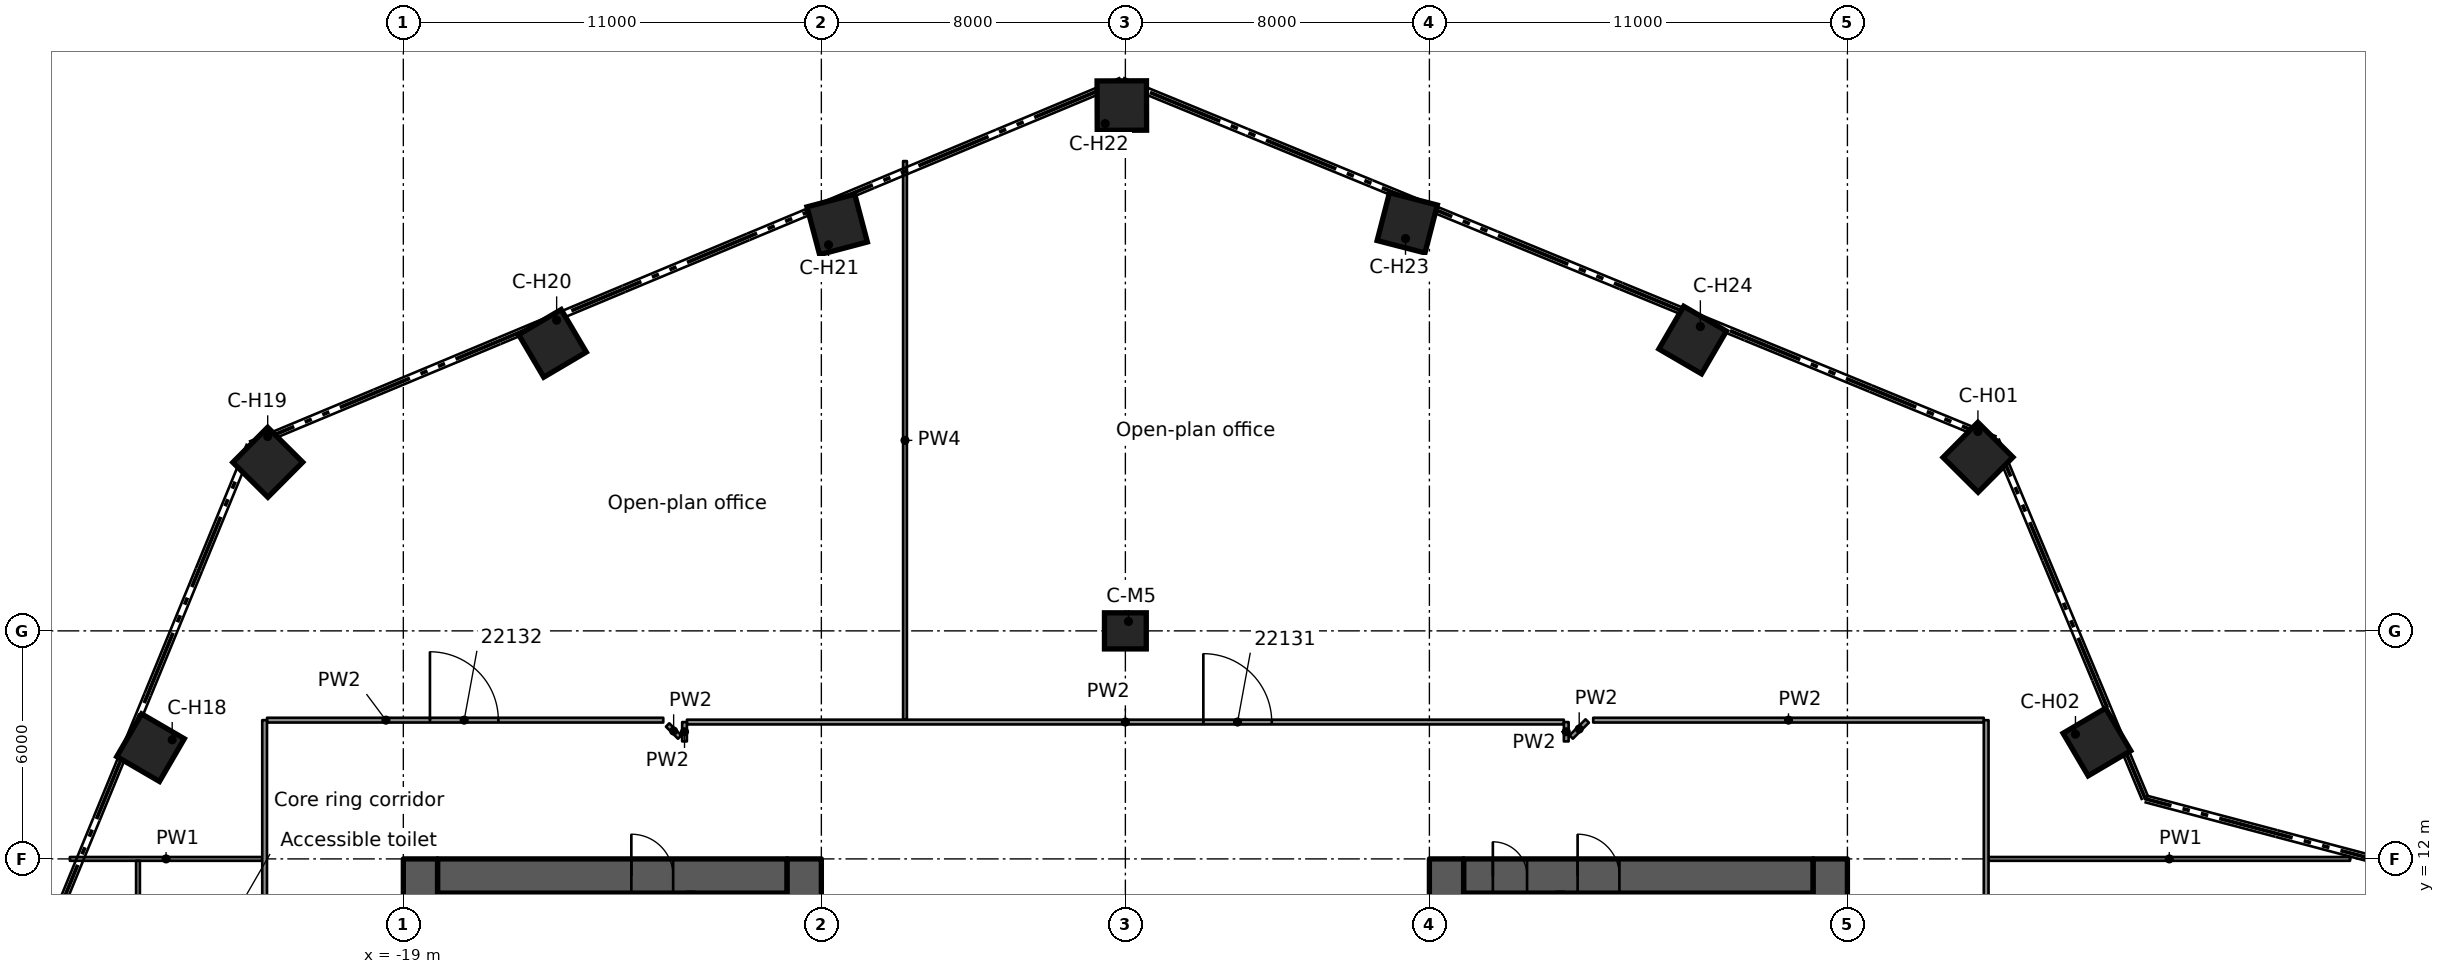
"""IFC4 building model, lengths in metres.
Left out: names, types, materials, properties, quantities, classifications, styles, units other than length and angle.
Written with IfcOpenShell. Run it as: python <this file> out.ifc"""

import sys

from ifc_helpers import new_model, si_unit, direction, frame, frame_2d, origin, origin_2d, place, context, subcontext, project, spatial, rectangle, extrude, element, fill, save


model = new_model("IFC4")
c1 = context("Model", 3, precision=1e-05, world=origin(), true_north=direction((0.0, 1.0)))
c2 = subcontext(c1, "Body", "Model", "MODEL_VIEW")
j1 = project(units=[si_unit("LENGTHUNIT", "METRE"), si_unit("PLANEANGLEUNIT", "RADIAN")], contexts=[c1])
p1 = place(None, origin())
s1 = spatial("IfcSite", under=j1, at=p1, CompositionType="ELEMENT")
p2 = place(p1, origin())
s2 = spatial("IfcBuilding", under=s1, at=p2, CompositionType="ELEMENT")
p3 = place(p2, frame((0.0, 0.0, 116.2)))
s3 = spatial("IfcBuildingStorey", under=s2, at=p3, CompositionType="ELEMENT", Elevation=116.2)
p4 = place(p3, frame((-18.1, 11.55, 0.0), z_axis=(0.0, 0.0, 1.0), x_axis=(1.0, 0.0, 0.0)))
e1 = element("IfcWall", 1, at=p4, inside=s3, PredefinedType="SHEAR", context=c2, shape_type="SweptSolid", body=[
    extrude(rectangle(XDim=9.2, YDim=0.9, at=frame_2d((4.6, 0.0))), origin(), (0.0, 0.0, 1.0), 3.5),
])
p5 = place(p4, frame((5.1, 0.0, 0.0)))
e2 = element("IfcOpeningElement", 2, at=p5, cuts=e1, PredefinedType="OPENING", context=c2, shape_type="SweptSolid", body=[
    extrude(rectangle(XDim=1.1, YDim=2.1, at=frame_2d((0.55, 1.05))), frame((0.0, 0.46, 0.0), z_axis=(0.0, -1.0, 0.0), x_axis=(1.0, 0.0, 0.0)), (0.0, 0.0, 1.0), 0.92),
])
p6 = place(p3, frame((-18.55, -12.0, 0.0), z_axis=(0.0, 0.0, 1.0), x_axis=(0.0, 1.0, 0.0)))
e3 = element("IfcWall", 3, at=p6, inside=s3, PredefinedType="SHEAR", context=c2, shape_type="SweptSolid", body=[
    extrude(rectangle(XDim=24.0, YDim=0.9, at=frame_2d((12.0, 0.0))), origin(), (0.0, 0.0, 1.0), 3.5),
])
p7 = place(p6, frame((10.1, 0.0, 0.0)))
e4 = element("IfcOpeningElement", 4, at=p7, cuts=e3, PredefinedType="OPENING", context=c2, shape_type="SweptSolid", body=[
    extrude(rectangle(XDim=1.8, YDim=2.1, at=frame_2d((0.9, 1.05))), frame((0.0, 0.46, 0.0), z_axis=(0.0, -1.0, 0.0), x_axis=(1.0, 0.0, 0.0)), (0.0, 0.0, 1.0), 0.92),
])
p8 = place(p3, frame((-8.45, -12.0, 0.0), z_axis=(0.0, 0.0, 1.0), x_axis=(0.0, 1.0, 0.0)))
e5 = element("IfcWall", 5, at=p8, inside=s3, PredefinedType="SHEAR", context=c2, shape_type="SweptSolid", body=[
    extrude(rectangle(XDim=24.0, YDim=0.9, at=frame_2d((12.0, 0.0))), origin(), (0.0, 0.0, 1.0), 3.5),
])
p9 = place(p8, frame((9.6, 0.0, 0.0)))
e6 = element("IfcOpeningElement", 6, at=p9, cuts=e5, PredefinedType="OPENING", context=c2, shape_type="SweptSolid", body=[
    extrude(rectangle(XDim=1.8, YDim=2.1, at=frame_2d((0.9, 1.05))), frame((0.0, 0.46, 0.0), z_axis=(0.0, -1.0, 0.0), x_axis=(1.0, 0.0, 0.0)), (0.0, 0.0, 1.0), 0.92),
])
p10 = place(p8, frame((19.65, 0.0, 0.0)))
e7 = element("IfcOpeningElement", 7, at=p10, cuts=e5, PredefinedType="OPENING", context=c2, shape_type="SweptSolid", body=[
    extrude(rectangle(XDim=1.1, YDim=2.1, at=frame_2d((0.55, 1.05))), frame((0.0, 0.46, 0.0), z_axis=(0.0, -1.0, 0.0), x_axis=(1.0, 0.0, 0.0)), (0.0, 0.0, 1.0), 0.92),
])
p11 = place(p3, frame((8.9, 11.55, 0.0), z_axis=(0.0, 0.0, 1.0), x_axis=(1.0, 0.0, 0.0)))
e8 = element("IfcWall", 8, at=p11, inside=s3, PredefinedType="SHEAR", context=c2, shape_type="SweptSolid", body=[
    extrude(rectangle(XDim=9.2, YDim=0.9, at=frame_2d((4.6, 0.0))), origin(), (0.0, 0.0, 1.0), 3.5),
])
p12 = place(p11, frame((3.0, 0.0, 0.0)))
e9 = element("IfcOpeningElement", 9, at=p12, cuts=e8, PredefinedType="OPENING", context=c2, shape_type="SweptSolid", body=[
    extrude(rectangle(XDim=1.1, YDim=2.1, at=frame_2d((0.55, 1.05))), frame((0.0, 0.46, 0.0), z_axis=(0.0, -1.0, 0.0), x_axis=(1.0, 0.0, 0.0)), (0.0, 0.0, 1.0), 0.92),
])
p13 = place(p11, frame((0.77, 0.0, 0.0)))
e10 = element("IfcOpeningElement", 10, at=p13, cuts=e8, PredefinedType="OPENING", context=c2, shape_type="SweptSolid", body=[
    extrude(rectangle(XDim=0.9, YDim=2.1, at=frame_2d((0.45, 1.05))), frame((0.0, 0.46, 0.0), z_axis=(0.0, -1.0, 0.0), x_axis=(1.0, 0.0, 0.0)), (0.0, 0.0, 1.0), 0.92),
])
p14 = place(p3, frame((8.45, -12.0, 0.0), z_axis=(0.0, 0.0, 1.0), x_axis=(0.0, 1.0, 0.0)))
e11 = element("IfcWall", 11, at=p14, inside=s3, PredefinedType="SHEAR", context=c2, shape_type="SweptSolid", body=[
    extrude(rectangle(XDim=24.0, YDim=0.9, at=frame_2d((12.0, 0.0))), origin(), (0.0, 0.0, 1.0), 3.5),
])
p15 = place(p14, frame((12.6, 0.0, 0.0)))
e12 = element("IfcOpeningElement", 12, at=p15, cuts=e11, PredefinedType="OPENING", context=c2, shape_type="SweptSolid", body=[
    extrude(rectangle(XDim=1.8, YDim=2.1, at=frame_2d((0.9, 1.05))), frame((0.0, 0.46, 0.0), z_axis=(0.0, -1.0, 0.0), x_axis=(1.0, 0.0, 0.0)), (0.0, 0.0, 1.0), 0.92),
])
p16 = place(p14, frame((3.25, 0.0, 0.0)))
e13 = element("IfcOpeningElement", 13, at=p16, cuts=e11, PredefinedType="OPENING", context=c2, shape_type="SweptSolid", body=[
    extrude(rectangle(XDim=1.1, YDim=2.1, at=frame_2d((0.55, 1.05))), frame((0.0, 0.46, 0.0), z_axis=(0.0, -1.0, 0.0), x_axis=(1.0, 0.0, 0.0)), (0.0, 0.0, 1.0), 0.92),
])
p17 = place(p3, frame((18.55, -12.0, 0.0), z_axis=(0.0, 0.0, 1.0), x_axis=(0.0, 1.0, 0.0)))
e14 = element("IfcWall", 14, at=p17, inside=s3, PredefinedType="SHEAR", context=c2, shape_type="SweptSolid", body=[
    extrude(rectangle(XDim=24.0, YDim=0.9, at=frame_2d((12.0, 0.0))), origin(), (0.0, 0.0, 1.0), 3.5),
])
p18 = place(p17, frame((12.1, 0.0, 0.0)))
e15 = element("IfcOpeningElement", 15, at=p18, cuts=e14, PredefinedType="OPENING", context=c2, shape_type="SweptSolid", body=[
    extrude(rectangle(XDim=1.8, YDim=2.1, at=frame_2d((0.9, 1.05))), frame((0.0, 0.46, 0.0), z_axis=(0.0, -1.0, 0.0), x_axis=(1.0, 0.0, 0.0)), (0.0, 0.0, 1.0), 0.92),
])
for number, where, z_axis, x_axis in (
    (16, (22.436, 22.567, 0.0), (0.0, 0.0, 1.0), (0.705, 0.709, 0.0)),
    (17, (25.565, 15.076, 0.0), (0.0, 0.0, 1.0), (0.861, 0.508, 0.0)),
    (18, (-25.652, 14.927, 0.0), (0.0, 0.0, 1.0), (-0.864, 0.503, 0.0)),
    (19, (-22.567, 22.436, 0.0), (0.0, 0.0, 1.0), (-0.709, 0.705, 0.0)),
    (20, (-15.076, 25.565, 0.0), (0.0, 0.0, 1.0), (-0.508, 0.861, 0.0)),
    (21, (-7.584, 28.694, 0.0), (0.0, 0.0, 1.0), (-0.256, 0.967, 0.0)),
    (22, (-0.093, 31.822, 0.0), (0.0, 0.0, 1.0), (-0.003, 1.0, 0.0)),
    (23, (7.417, 28.737, 0.0), (0.0, 0.0, 1.0), (0.25, 0.968, 0.0)),
    (24, (14.927, 25.652, 0.0), (0.0, 0.0, 1.0), (0.503, 0.864, 0.0)),
):
    element("IfcColumn", number, at=place(p3, frame(where, z_axis=z_axis, x_axis=x_axis)), inside=s3, PredefinedType="COLUMN", context=c2, shape_type="SweptSolid", body=[
        extrude(rectangle(XDim=1.3, YDim=1.3, at=origin_2d()), origin(), (0.0, 0.0, 1.0), 3.5),
    ])
p19 = place(p3, frame((0.0, 18.0, 0.0), z_axis=(0.0, 0.0, 1.0), x_axis=(1.0, 0.0, 0.0)))
e25 = element("IfcColumn", 25, at=p19, inside=s3, PredefinedType="COLUMN", context=c2, shape_type="SweptSolid", body=[
    extrude(rectangle(XDim=1.1, YDim=0.95, at=origin_2d()), origin(), (0.0, 0.0, 1.0), 3.5),
])
p20 = place(p3, frame((-11.44, 6.975, 0.0), z_axis=(0.0, 0.0, 1.0), x_axis=(0.0, 1.0, 0.0)))
e26 = element("IfcWall", 26, at=p20, inside=s3, PredefinedType="SOLIDWALL", context=c2, shape_type="SweptSolid", body=[
    extrude(rectangle(XDim=4.125, YDim=0.2, at=frame_2d((2.062, 0.0))), origin(), (0.0, 0.0, 1.0), 3.09),
])
p21 = place(p20, frame((2.1, 0.0, 0.0)))
e27 = element("IfcOpeningElement", 27, at=p21, cuts=e26, PredefinedType="OPENING", context=c2, shape_type="SweptSolid", body=[
    extrude(rectangle(XDim=1.1, YDim=2.1, at=frame_2d((0.55, 1.05))), frame((0.0, 0.11, 0.0), z_axis=(0.0, -1.0, 0.0), x_axis=(1.0, 0.0, 0.0)), (0.0, 0.0, 1.0), 0.22),
])
p22 = place(p3, frame((11.44, 11.1, 0.0), z_axis=(0.0, 0.0, 1.0), x_axis=(0.0, -1.0, 0.0)))
e28 = element("IfcWall", 28, at=p22, inside=s3, PredefinedType="SOLIDWALL", context=c2, shape_type="SweptSolid", body=[
    extrude(rectangle(XDim=4.125, YDim=0.2, at=frame_2d((2.062, 0.0))), origin(), (0.0, 0.0, 1.0), 3.09),
])
p23 = place(p3, frame((-12.046, 15.524, 0.0), z_axis=(0.0, 0.0, 1.0), x_axis=(0.707106781187, -0.707106781187, 0.0)))
e29 = element("IfcWall", 29, at=p23, inside=s3, PredefinedType="PARTITIONING", context=c2, shape_type="SweptSolid", body=[
    extrude(rectangle(XDim=0.449, YDim=0.125, at=frame_2d((0.225, 0.0))), origin(), (0.0, 0.0, 1.0), 3.08),
])
p24 = place(p3, frame((-27.774, 12.0, 0.0), z_axis=(0.0, 0.0, 1.0), x_axis=(1.0, 0.0, 0.0)))
e30 = element("IfcWall", 30, at=p24, inside=s3, PredefinedType="PARTITIONING", context=c2, shape_type="SweptSolid", body=[
    extrude(rectangle(XDim=5.062, YDim=0.1, at=frame_2d((2.531, 0.0))), origin(), (0.0, 0.0, 1.0), 3.08),
])
p25 = place(p3, frame((22.713, 12.0, 0.0), z_axis=(0.0, 0.0, 1.0), x_axis=(1.0, 0.0, 0.0)))
e31 = element("IfcWall", 31, at=p25, inside=s3, PredefinedType="PARTITIONING", context=c2, shape_type="SweptSolid", body=[
    extrude(rectangle(XDim=9.513, YDim=0.1, at=frame_2d((4.757, 0.0))), origin(), (0.0, 0.0, 1.0), 3.08),
])
p26 = place(p3, frame((-11.537, 15.601, 0.0), z_axis=(0.0, 0.0, 1.0), x_axis=(1.0, 0.0, 0.0)))
e32 = element("IfcWall", 32, at=p26, inside=s3, PredefinedType="PARTITIONING", context=c2, shape_type="SweptSolid", body=[
    extrude(rectangle(XDim=23.074, YDim=0.125, at=frame_2d((11.537, 0.0))), origin(), (0.0, 0.0, 1.0), 3.08),
])
p27 = place(p26, frame((13.588, 0.0, 0.0)))
e33 = element("IfcOpeningElement", 33, at=p27, cuts=e32, PredefinedType="OPENING", context=c2, shape_type="SweptSolid", body=[
    extrude(rectangle(XDim=1.8, YDim=2.1, at=frame_2d((0.9, 1.05))), frame((0.0, 0.073, 0.0), z_axis=(0.0, -1.0, 0.0), x_axis=(1.0, 0.0, 0.0)), (0.0, 0.0, 1.0), 0.145),
])
p28 = place(p3, frame((-22.587, 15.651, 0.0), z_axis=(0.0, 0.0, 1.0), x_axis=(1.0, 0.0, 0.0)))
e34 = element("IfcWall", 34, at=p28, inside=s3, PredefinedType="PARTITIONING", context=c2, shape_type="SweptSolid", body=[
    extrude(rectangle(XDim=10.427, YDim=0.125, at=frame_2d((5.213, 0.0))), origin(), (0.0, 0.0, 1.0), 3.08),
])
p29 = place(p28, frame((4.288, 0.0, 0.0)))
e35 = element("IfcOpeningElement", 35, at=p29, cuts=e34, PredefinedType="OPENING", context=c2, shape_type="SweptSolid", body=[
    extrude(rectangle(XDim=1.8, YDim=2.1, at=frame_2d((0.9, 1.05))), frame((0.0, 0.073, 0.0), z_axis=(0.0, -1.0, 0.0), x_axis=(1.0, 0.0, 0.0)), (0.0, 0.0, 1.0), 0.145),
])
p30 = place(p3, frame((12.311, 15.651, 0.0), z_axis=(0.0, 0.0, 1.0), x_axis=(1.0, 0.0, 0.0)))
e36 = element("IfcWall", 36, at=p30, inside=s3, PredefinedType="PARTITIONING", context=c2, shape_type="SweptSolid", body=[
    extrude(rectangle(XDim=10.276, YDim=0.125, at=frame_2d((5.138, 0.0))), origin(), (0.0, 0.0, 1.0), 3.08),
])
p31 = place(p3, frame((11.731, 15.207, 0.0), z_axis=(0.0, 0.0, 1.0), x_axis=(0.707311295066, 0.70690220814, 0.0)))
e37 = element("IfcWall", 37, at=p31, inside=s3, PredefinedType="PARTITIONING", context=c2, shape_type="SweptSolid", body=[
    extrude(rectangle(XDim=0.597, YDim=0.125, at=frame_2d((0.298, 0.0))), origin(), (0.0, 0.0, 1.0), 3.08),
])
p32 = place(p3, frame((32.186, -2.265, 0.0), z_axis=(0.0, 0.0, 1.0), x_axis=(0.2560045642, 0.966675572831, 0.0)))
e38 = element("IfcWall", 38, at=p32, inside=s3, PredefinedType="PARTITIONING", context=c2, shape_type="SweptSolid", body=[
    extrude(rectangle(XDim=14.199, YDim=0.1, at=frame_2d((7.1, 0.0))), origin(), (0.0, 0.0, 1.0), 2.445),
])
p33 = place(p3, frame((-11.601, 15.092, 0.0), z_axis=(0.0, 0.0, 1.0), x_axis=(0.00192214926, 0.999998152669, 0.0)))
e39 = element("IfcWall", 39, at=p33, inside=s3, PredefinedType="PARTITIONING", context=c2, shape_type="SweptSolid", body=[
    extrude(rectangle(XDim=0.508, YDim=0.125, at=frame_2d((0.254, 0.0))), origin(), (0.0, 0.0, 1.0), 3.08),
])
p34 = place(p3, frame((22.651, 15.65, 0.0), z_axis=(0.0, 0.0, 1.0), x_axis=(0.0, -1.0, 0.0)))
e40 = element("IfcWall", 40, at=p34, inside=s3, PredefinedType="PARTITIONING", context=c2, shape_type="SweptSolid", body=[
    extrude(rectangle(XDim=17.951, YDim=0.125, at=frame_2d((8.976, 0.0))), origin(), (0.0, 0.0, 1.0), 3.08),
])
p35 = place(p34, frame((10.25, 0.0, 0.0)))
e41 = element("IfcOpeningElement", 41, at=p35, cuts=e40, PredefinedType="OPENING", context=c2, shape_type="SweptSolid", body=[
    extrude(rectangle(XDim=0.9, YDim=2.1, at=frame_2d((0.45, 1.05))), frame((0.0, 0.073, 0.0), z_axis=(0.0, -1.0, 0.0), x_axis=(1.0, 0.0, 0.0)), (0.0, 0.0, 1.0), 0.145),
])
p36 = place(p3, frame((11.601, 15.092, 0.0), z_axis=(0.0, 0.0, 1.0), x_axis=(0.0, 1.0, 0.0)))
e42 = element("IfcWall", 42, at=p36, inside=s3, PredefinedType="PARTITIONING", context=c2, shape_type="SweptSolid", body=[
    extrude(rectangle(XDim=0.508, YDim=0.125, at=frame_2d((0.254, 0.0))), origin(), (0.0, 0.0, 1.0), 3.08),
])
p37 = place(p3, frame((-5.799, 15.664, 0.0), z_axis=(0.0, 0.0, 1.0), x_axis=(0.0, 1.0, 0.0)))
e43 = element("IfcWall", 43, at=p37, inside=s3, PredefinedType="PARTITIONING", context=c2, shape_type="SweptSolid", body=[
    extrude(rectangle(XDim=14.697, YDim=0.1, at=frame_2d((7.349, 0.0))), origin(), (0.0, 0.0, 1.0), 2.445),
])
p38 = place(p3, frame((-22.65, -15.651, 0.0), z_axis=(0.0, 0.0, 1.0), x_axis=(0.0, 1.0, 0.0)))
e44 = element("IfcWall", 44, at=p38, inside=s3, PredefinedType="PARTITIONING", context=c2, shape_type="SweptSolid", body=[
    extrude(rectangle(XDim=31.302, YDim=0.125, at=frame_2d((15.651, 0.0))), origin(), (0.0, 0.0, 1.0), 3.08),
])
p39 = place(p38, frame((8.251, 0.0, 0.0)))
e45 = element("IfcOpeningElement", 45, at=p39, cuts=e44, PredefinedType="OPENING", context=c2, shape_type="SweptSolid", body=[
    extrude(rectangle(XDim=0.9, YDim=2.1, at=frame_2d((0.45, 1.05))), frame((0.0, 0.073, 0.0), z_axis=(0.0, -1.0, 0.0), x_axis=(1.0, 0.0, 0.0)), (0.0, 0.0, 1.0), 0.145),
])
p40 = place(p38, frame((12.251, 0.0, 0.0)))
e46 = element("IfcOpeningElement", 46, at=p40, cuts=e44, PredefinedType="OPENING", context=c2, shape_type="SweptSolid", body=[
    extrude(rectangle(XDim=0.9, YDim=2.1, at=frame_2d((0.45, 1.05))), frame((0.0, 0.073, 0.0), z_axis=(0.0, -1.0, 0.0), x_axis=(1.0, 0.0, 0.0)), (0.0, 0.0, 1.0), 0.145),
])
p41 = place(p38, frame((24.002, 0.0, 0.0)))
e47 = element("IfcOpeningElement", 47, at=p41, cuts=e44, PredefinedType="OPENING", context=c2, shape_type="SweptSolid", body=[
    extrude(rectangle(XDim=1.1, YDim=2.1, at=frame_2d((0.55, 1.05))), frame((0.0, 0.073, 0.0), z_axis=(0.0, -1.0, 0.0), x_axis=(1.0, 0.0, 0.0)), (0.0, 0.0, 1.0), 0.145),
])
p42 = place(p3, frame((-25.982, 6.001, 0.0), z_axis=(0.0, 0.0, 1.0), x_axis=(0.0, 1.0, 0.0)))
e48 = element("IfcWall", 48, at=p42, inside=s3, PredefinedType="PARTITIONING", context=c2, shape_type="SweptSolid", body=[
    extrude(rectangle(XDim=5.949, YDim=0.1, at=frame_2d((2.975, 0.0))), origin(), (0.0, 0.0, 1.0), 3.08),
])
p43 = place(p5, origin())
e49 = element("IfcDoor", 49, at=p43, inside=s3, OperationType="SINGLE_SWING_RIGHT", PredefinedType="DOOR", context=c2, shape_type="SweptSolid", body=[
    extrude(rectangle(XDim=1.1, YDim=2.1, at=frame_2d((0.55, 1.05))), frame((0.0, 0.025, 0.0), z_axis=(0.0, -1.0, 0.0), x_axis=(1.0, 0.0, 0.0)), (0.0, 0.0, 1.0), 0.05),
])
fill(e2, e49)
p44 = place(p12, origin())
e50 = element("IfcDoor", 50, at=p44, inside=s3, OperationType="SINGLE_SWING_LEFT", PredefinedType="DOOR", context=c2, shape_type="SweptSolid", body=[
    extrude(rectangle(XDim=1.1, YDim=2.1, at=frame_2d((0.55, 1.05))), frame((0.0, 0.025, 0.0), z_axis=(0.0, -1.0, 0.0), x_axis=(1.0, 0.0, 0.0)), (0.0, 0.0, 1.0), 0.05),
])
fill(e9, e50)
p45 = place(p13, origin())
e51 = element("IfcDoor", 51, at=p45, inside=s3, OperationType="SINGLE_SWING_LEFT", PredefinedType="DOOR", context=c2, shape_type="SweptSolid", body=[
    extrude(rectangle(XDim=0.9, YDim=2.1, at=frame_2d((0.45, 1.05))), frame((0.0, 0.025, 0.0), z_axis=(0.0, -1.0, 0.0), x_axis=(1.0, 0.0, 0.0)), (0.0, 0.0, 1.0), 0.05),
])
fill(e10, e51)
p46 = place(p27, origin())
e52 = element("IfcDoor", 52, at=p46, inside=s3, OperationType="DOUBLE_DOOR_SINGLE_SWING", PredefinedType="DOOR", context=c2, shape_type="SweptSolid", body=[
    extrude(rectangle(XDim=1.8, YDim=2.1, at=frame_2d((0.9, 1.05))), frame((0.0, 0.025, 0.0), z_axis=(0.0, -1.0, 0.0), x_axis=(1.0, 0.0, 0.0)), (0.0, 0.0, 1.0), 0.05),
])
fill(e33, e52)
p47 = place(p29, origin())
e53 = element("IfcDoor", 53, at=p47, inside=s3, OperationType="DOUBLE_DOOR_SINGLE_SWING", PredefinedType="DOOR", context=c2, shape_type="SweptSolid", body=[
    extrude(rectangle(XDim=1.8, YDim=2.1, at=frame_2d((0.9, 1.05))), frame((0.0, 0.025, 0.0), z_axis=(0.0, -1.0, 0.0), x_axis=(1.0, 0.0, 0.0)), (0.0, 0.0, 1.0), 0.05),
])
fill(e35, e53)
save(model, sys.argv[1])
